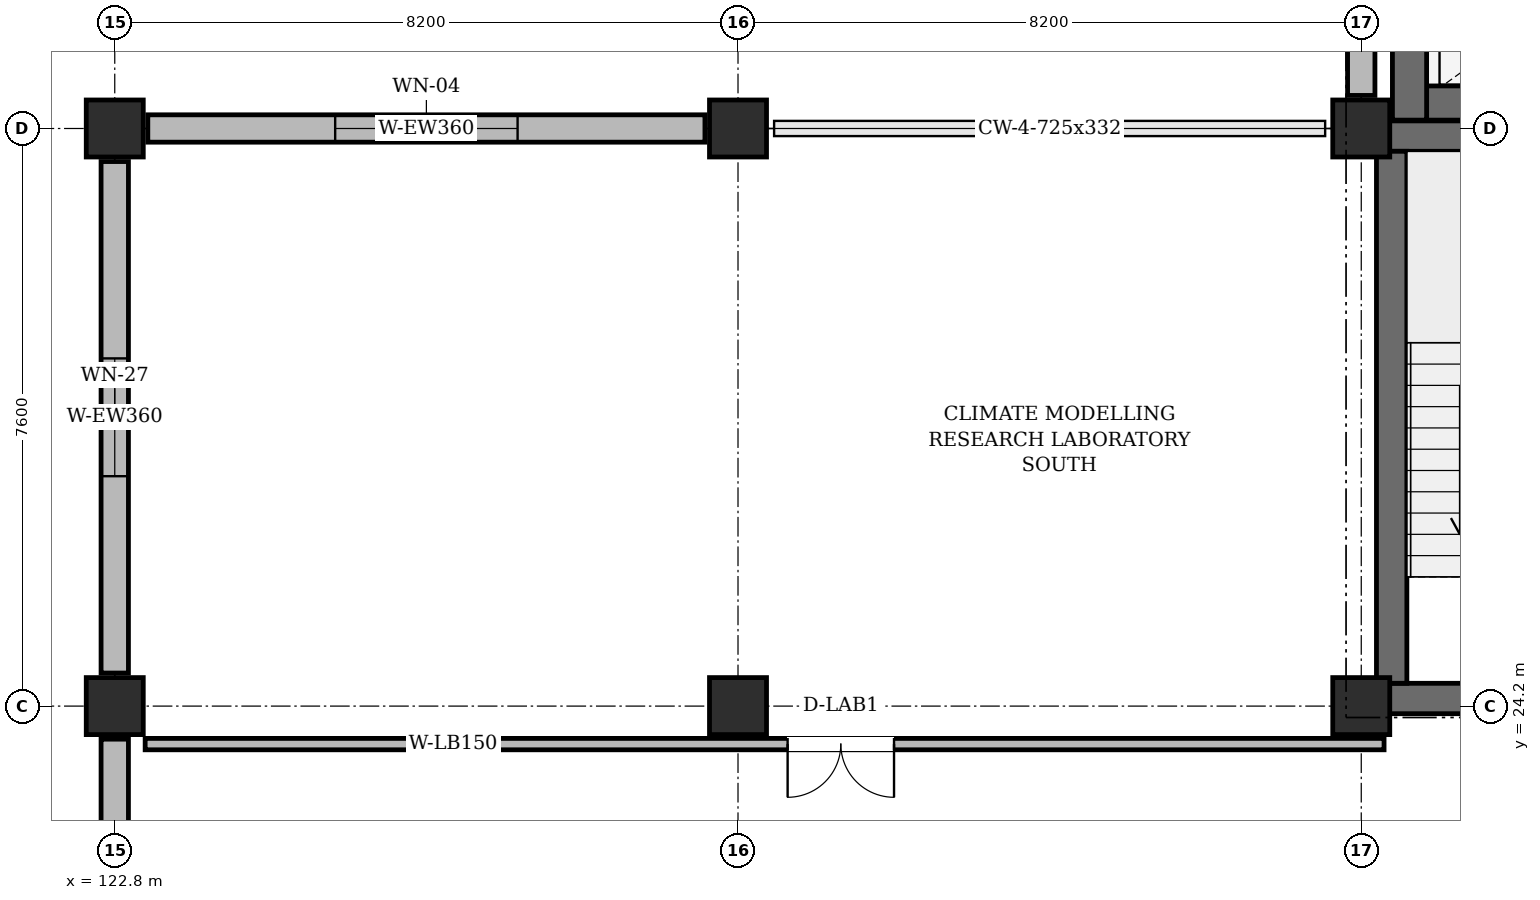
"""IFC4 building model, lengths in metres.
Left out: names, types, materials, properties, quantities, classifications, styles, units other than length and angle.
Written with IfcOpenShell. Run it as: python <this file> out.ifc"""

import sys

from ifc_helpers import new_model, si_unit, direction, frame, frame_2d, origin, origin_2d, place, context, subcontext, project, spatial, rectangle, extrude, element, fill, save


model = new_model("IFC4")
c1 = context("Model", 3, precision=1e-05, world=origin(), true_north=direction((0.0, 1.0)))
c2 = subcontext(c1, "Body", "Model", "MODEL_VIEW")
j1 = project(units=[si_unit("LENGTHUNIT", "METRE"), si_unit("PLANEANGLEUNIT", "RADIAN")], contexts=[c1])
p1 = place(None, origin())
s1 = spatial("IfcSite", under=j1, at=p1, CompositionType="ELEMENT")
p2 = place(p1, origin())
s2 = spatial("IfcBuilding", under=s1, at=p2, CompositionType="ELEMENT")
p3 = place(p2, frame((0.0, 0.0, 57.6)))
s3 = spatial("IfcBuildingStorey", under=s2, at=p3, CompositionType="ELEMENT", Elevation=57.6)
for number, where, z_axis, x_axis in (
    (1, (122.8, 24.2, 0.0), (0.0, 0.0, 1.0), (1.0, 0.0, 0.0)),
    (2, (122.8, 31.8, 0.0), (0.0, 0.0, 1.0), (1.0, 0.0, 0.0)),
    (3, (131.0, 24.2, 0.0), (0.0, 0.0, 1.0), (1.0, 0.0, 0.0)),
    (4, (131.0, 31.8, 0.0), (0.0, 0.0, 1.0), (1.0, 0.0, 0.0)),
    (5, (139.2, 24.2, 0.0), (0.0, 0.0, 1.0), (1.0, 0.0, 0.0)),
    (6, (139.2, 31.8, 0.0), (0.0, 0.0, 1.0), (1.0, 0.0, 0.0)),
):
    element("IfcColumn", number, at=place(p3, frame(where, z_axis=z_axis, x_axis=x_axis)), inside=s3, PredefinedType="COLUMN", context=c2, shape_type="SweptSolid", body=[
        extrude(rectangle(XDim=0.75, YDim=0.75, at=origin_2d()), origin(), (0.0, 0.0, 1.0), 3.92),
    ])
p4 = place(p3, frame((139.2, 38.965, 0.0), z_axis=(0.0, 0.0, 1.0), x_axis=(0.0, -1.0, 0.0)))
e7 = element("IfcWall", 7, at=p4, inside=s3, PredefinedType="SOLIDWALL", context=c2, shape_type="SweptSolid", body=[
    extrude(rectangle(XDim=6.73, YDim=0.36, at=frame_2d((3.365, 0.0))), origin(), (0.0, 0.0, 1.0), 3.305),
])
p5 = place(p4, frame((2.89, 0.0, 0.95)))
e8 = element("IfcOpeningElement", 8, at=p5, cuts=e7, PredefinedType="OPENING", context=c2, shape_type="SweptSolid", body=[
    extrude(rectangle(XDim=0.95, YDim=1.5, at=frame_2d((0.475, 0.75))), frame((0.0, 0.192, 0.0), z_axis=(0.0, -1.0, 0.0), x_axis=(1.0, 0.0, 0.0)), (0.0, 0.0, 1.0), 0.384),
])
p6 = place(p3, frame((130.565, 31.8, 0.0), z_axis=(0.0, 0.0, 1.0), x_axis=(-1.0, 0.0, 0.0)))
e9 = element("IfcWall", 9, at=p6, inside=s3, PredefinedType="SOLIDWALL", context=c2, shape_type="SweptSolid", body=[
    extrude(rectangle(XDim=7.33, YDim=0.36, at=frame_2d((3.665, 0.0))), origin(), (0.0, 0.0, 1.0), 3.305),
])
p7 = place(p6, frame((2.465, 0.0, 0.95)))
e10 = element("IfcOpeningElement", 10, at=p7, cuts=e9, PredefinedType="OPENING", context=c2, shape_type="SweptSolid", body=[
    extrude(rectangle(XDim=2.4, YDim=2.1, at=frame_2d((1.2, 1.05))), frame((0.0, 0.192, 0.0), z_axis=(0.0, -1.0, 0.0), x_axis=(1.0, 0.0, 0.0)), (0.0, 0.0, 1.0), 0.384),
])
p8 = place(p3, frame((122.8, 31.365, 0.0), z_axis=(0.0, 0.0, 1.0), x_axis=(0.0, -1.0, 0.0)))
e11 = element("IfcWall", 11, at=p8, inside=s3, PredefinedType="SOLIDWALL", context=c2, shape_type="SweptSolid", body=[
    extrude(rectangle(XDim=6.73, YDim=0.36, at=frame_2d((3.365, 0.0))), origin(), (0.0, 0.0, 1.0), 3.305),
])
p9 = place(p8, frame((2.59, 0.0, 0.95)))
e12 = element("IfcOpeningElement", 12, at=p9, cuts=e11, PredefinedType="OPENING", context=c2, shape_type="SweptSolid", body=[
    extrude(rectangle(XDim=1.55, YDim=1.75, at=frame_2d((0.775, 0.875))), frame((0.0, 0.192, 0.0), z_axis=(0.0, -1.0, 0.0), x_axis=(1.0, 0.0, 0.0)), (0.0, 0.0, 1.0), 0.384),
])
p10 = place(p3, frame((122.8, 23.765, 0.0), z_axis=(0.0, 0.0, 1.0), x_axis=(0.0, -1.0, 0.0)))
e13 = element("IfcWall", 13, at=p10, inside=s3, PredefinedType="SOLIDWALL", context=c2, shape_type="SweptSolid", body=[
    extrude(rectangle(XDim=6.73, YDim=0.36, at=frame_2d((3.365, 0.0))), origin(), (0.0, 0.0, 1.0), 3.305),
])
p11 = place(p10, frame((2.615, 0.0, 0.95)))
e14 = element("IfcOpeningElement", 14, at=p11, cuts=e13, PredefinedType="OPENING", context=c2, shape_type="SweptSolid", body=[
    extrude(rectangle(XDim=1.5, YDim=2.1, at=frame_2d((0.75, 1.05))), frame((0.0, 0.192, 0.0), z_axis=(0.0, -1.0, 0.0), x_axis=(1.0, 0.0, 0.0)), (0.0, 0.0, 1.0), 0.384),
])
p12 = place(p3, frame((139.4, 24.3, 0.0), z_axis=(0.0, 0.0, 1.0), x_axis=(1.0, 0.0, 0.0)))
e15 = element("IfcWall", 15, at=p12, inside=s3, PredefinedType="SHEAR", context=c2, shape_type="SweptSolid", body=[
    extrude(rectangle(XDim=3.8, YDim=0.4, at=frame_2d((1.9, 0.0))), origin(), (0.0, 0.0, 1.0), 3.92),
])
p13 = place(p12, frame((1.3, 0.0, 0.0)))
e16 = element("IfcOpeningElement", 16, at=p13, cuts=e15, PredefinedType="OPENING", context=c2, shape_type="SweptSolid", body=[
    extrude(rectangle(XDim=1.2, YDim=2.2, at=frame_2d((0.6, 1.1))), frame((0.0, 0.212, 0.0), z_axis=(0.0, -1.0, 0.0), x_axis=(1.0, 0.0, 0.0)), (0.0, 0.0, 1.0), 0.424),
])
p14 = place(p3, frame((139.4, 31.7, 0.0), z_axis=(0.0, 0.0, 1.0), x_axis=(1.0, 0.0, 0.0)))
e17 = element("IfcWall", 17, at=p14, inside=s3, PredefinedType="SHEAR", context=c2, shape_type="SweptSolid", body=[
    extrude(rectangle(XDim=3.8, YDim=0.4, at=frame_2d((1.9, 0.0))), origin(), (0.0, 0.0, 1.0), 3.92),
])
p15 = place(p3, frame((139.6, 24.5, 0.0), z_axis=(0.0, 0.0, 1.0), x_axis=(0.0, 1.0, 0.0)))
e18 = element("IfcWall", 18, at=p15, inside=s3, PredefinedType="SHEAR", context=c2, shape_type="SweptSolid", body=[
    extrude(rectangle(XDim=7.0, YDim=0.4, at=frame_2d((3.5, 0.0))), origin(), (0.0, 0.0, 1.0), 3.92),
])
p16 = place(p3, frame((140.06, 32.135, 0.0), z_axis=(0.0, 0.0, 1.0), x_axis=(1.0, 0.0, 0.0)))
e19 = element("IfcWall", 19, at=p16, inside=s3, PredefinedType="SHEAR", context=c2, shape_type="SweptSolid", body=[
    extrude(rectangle(XDim=2.74, YDim=0.45, at=frame_2d((1.37, 0.0))), origin(), (0.0, 0.0, 1.0), 3.92),
])
p17 = place(p3, frame((139.835, 31.91, 0.0), z_axis=(0.0, 0.0, 1.0), x_axis=(0.0, 1.0, 0.0)))
e20 = element("IfcWall", 20, at=p17, inside=s3, PredefinedType="SHEAR", context=c2, shape_type="SweptSolid", body=[
    extrude(rectangle(XDim=2.58, YDim=0.45, at=frame_2d((1.29, 0.0))), origin(), (0.0, 0.0, 1.0), 3.92),
])
p18 = place(p3, frame((123.2, 23.7, 0.0), z_axis=(0.0, 0.0, 1.0), x_axis=(1.0, 0.0, 0.0)))
e21 = element("IfcWall", 21, at=p18, inside=s3, PredefinedType="PARTITIONING", context=c2, shape_type="SweptSolid", body=[
    extrude(rectangle(XDim=16.3, YDim=0.15, at=frame_2d((8.15, 0.0))), origin(), (0.0, 0.0, 1.0), 3.805),
])
p19 = place(p18, frame((8.453, 0.0, 0.0)))
e22 = element("IfcOpeningElement", 22, at=p19, cuts=e21, PredefinedType="OPENING", context=c2, shape_type="SweptSolid", body=[
    extrude(rectangle(XDim=1.4, YDim=2.2, at=frame_2d((0.7, 1.1))), frame((0.0, 0.087, 0.0), z_axis=(0.0, -1.0, 0.0), x_axis=(1.0, 0.0, 0.0)), (0.0, 0.0, 1.0), 0.174),
])
p20 = place(p7, origin())
e23 = element("IfcWindow", 23, at=p20, inside=s3, PartitioningType="TRIPLE_PANEL_VERTICAL", PredefinedType="WINDOW", context=c2, shape_type="SweptSolid", body=[
    extrude(rectangle(XDim=2.4, YDim=2.1, at=frame_2d((1.2, 1.05))), frame((0.0, 0.03, 0.0), z_axis=(0.0, -1.0, 0.0), x_axis=(1.0, 0.0, 0.0)), (0.0, 0.0, 1.0), 0.06),
])
fill(e10, e23)
p21 = place(p9, origin())
e24 = element("IfcWindow", 24, at=p21, inside=s3, PartitioningType="DOUBLE_PANEL_VERTICAL", PredefinedType="WINDOW", context=c2, shape_type="SweptSolid", body=[
    extrude(rectangle(XDim=1.55, YDim=1.75, at=frame_2d((0.775, 0.875))), frame((0.0, 0.03, 0.0), z_axis=(0.0, -1.0, 0.0), x_axis=(1.0, 0.0, 0.0)), (0.0, 0.0, 1.0), 0.06),
])
fill(e12, e24)
p22 = place(p19, frame((1.4, 0.0, 0.0), z_axis=(0.0, 0.0, 1.0), x_axis=(-1.0, 0.0, 0.0)))
e25 = element("IfcDoor", 25, at=p22, inside=s3, OperationType="DOUBLE_DOOR_SINGLE_SWING", PredefinedType="DOOR", context=c2, shape_type="SweptSolid", body=[
    extrude(rectangle(XDim=1.4, YDim=2.2, at=frame_2d((0.7, 1.1))), frame((0.0, 0.025, 0.0), z_axis=(0.0, -1.0, 0.0), x_axis=(1.0, 0.0, 0.0)), (0.0, 0.0, 1.0), 0.05),
])
fill(e22, e25)
save(model, sys.argv[1])
